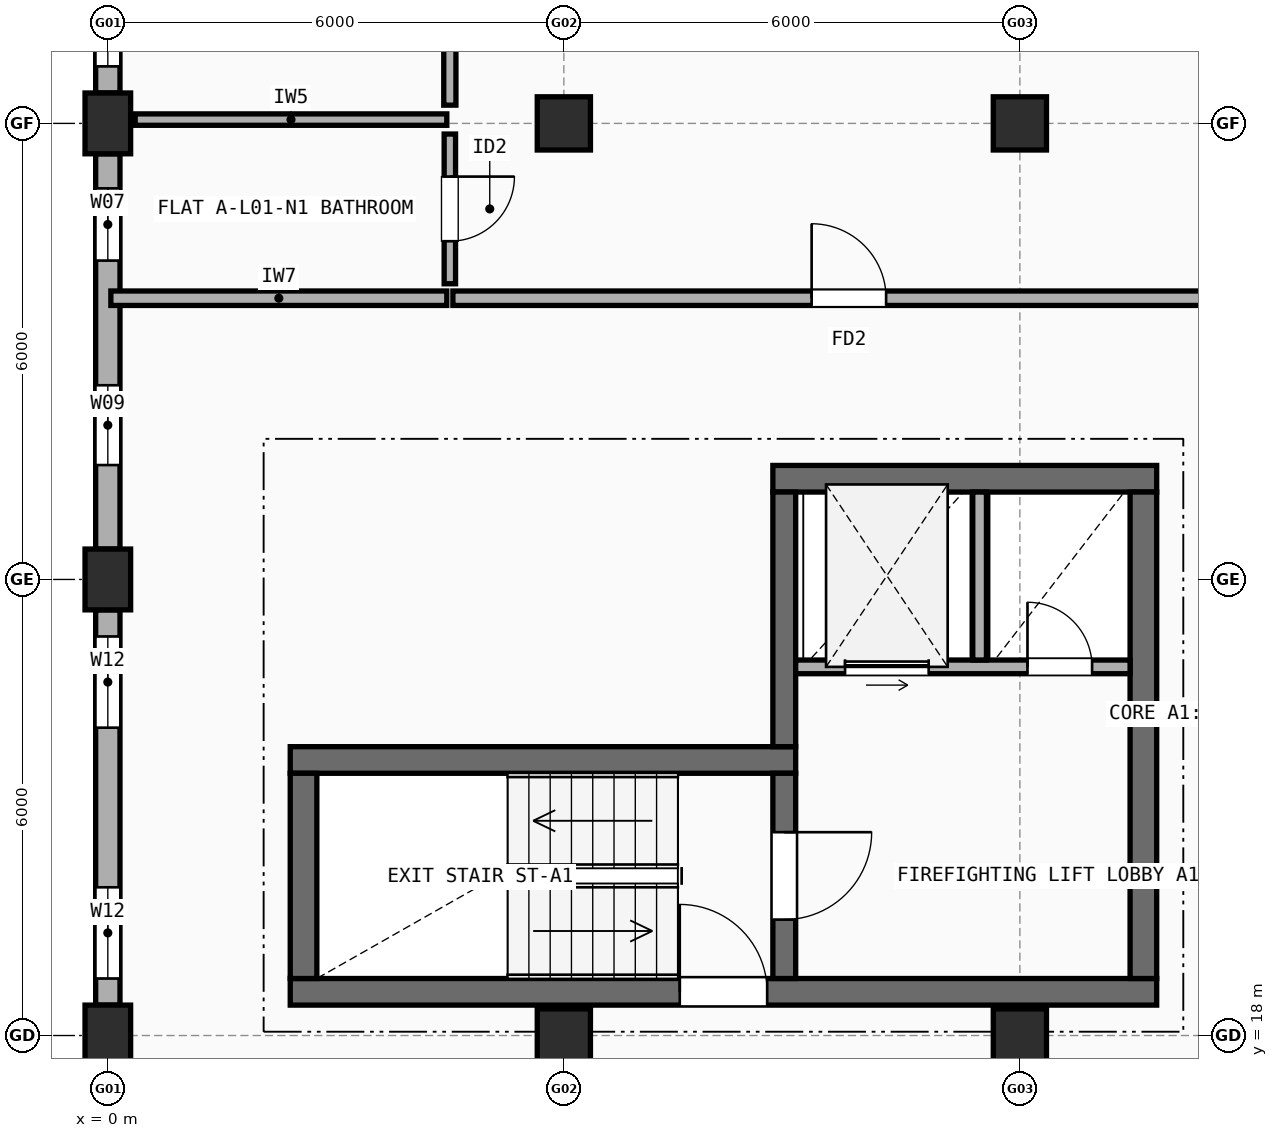
"""IFC4 building model, lengths in metres.
Left out: names, types, materials, properties, quantities, classifications, styles, units other than length and angle.
Written with IfcOpenShell. Run it as: python <this file> out.ifc"""

import sys

from ifc_helpers import new_model, si_unit, direction, frame, frame_2d, origin, origin_2d, place, context, subcontext, project, spatial, rectangle, extrude, element, fill, save


model = new_model("IFC4")
c1 = context("Model", 3, precision=1e-05, world=origin(), true_north=direction((0.0, 1.0)))
c2 = subcontext(c1, "Body", "Model", "MODEL_VIEW")
j1 = project(units=[si_unit("LENGTHUNIT", "METRE"), si_unit("PLANEANGLEUNIT", "RADIAN")], contexts=[c1])
p1 = place(None, origin())
s1 = spatial("IfcSite", under=j1, at=p1, CompositionType="ELEMENT")
p2 = place(p1, origin())
s2 = spatial("IfcBuilding", under=s1, at=p2, CompositionType="ELEMENT")
p3 = place(p2, frame((0.0, 0.0, 4.5)))
s3 = spatial("IfcBuildingStorey", under=s2, at=p3, CompositionType="ELEMENT", Elevation=4.5)
for number, where, z_axis, x_axis in (
    (1, (0.0, 18.0, 0.0), (0.0, 0.0, 1.0), (1.0, 0.0, 0.0)),
    (2, (0.0, 24.0, 0.0), (0.0, 0.0, 1.0), (1.0, 0.0, 0.0)),
    (3, (0.0, 30.0, 0.0), (0.0, 0.0, 1.0), (1.0, 0.0, 0.0)),
):
    element("IfcColumn", number, at=place(p3, frame(where, z_axis=z_axis, x_axis=x_axis)), inside=s3, PredefinedType="COLUMN", context=c2, shape_type="SweptSolid", body=[
        extrude(rectangle(XDim=0.6, YDim=0.8, at=origin_2d()), origin(), (0.0, 0.0, 1.0), 2.945),
    ])
for number, where, z_axis, x_axis in (
    (4, (6.0, 18.0, 0.0), (0.0, 0.0, 1.0), (1.0, 0.0, 0.0)),
    (5, (6.0, 30.0, 0.0), (0.0, 0.0, 1.0), (1.0, 0.0, 0.0)),
    (6, (12.0, 18.0, 0.0), (0.0, 0.0, 1.0), (1.0, 0.0, 0.0)),
    (7, (12.0, 30.0, 0.0), (0.0, 0.0, 1.0), (1.0, 0.0, 0.0)),
):
    element("IfcColumn", number, at=place(p3, frame(where, z_axis=z_axis, x_axis=x_axis)), inside=s3, PredefinedType="COLUMN", context=c2, shape_type="SweptSolid", body=[
        extrude(rectangle(XDim=0.7, YDim=0.7, at=origin_2d()), origin(), (0.0, 0.0, 1.0), 2.945),
    ])
p4 = place(p3, frame((0.0, 35.6, 0.0), z_axis=(0.0, 0.0, 1.0), x_axis=(0.0, -1.0, 0.0)))
e8 = element("IfcWall", 8, at=p4, inside=s3, PredefinedType="STANDARD", context=c2, shape_type="SweptSolid", body=[
    extrude(rectangle(XDim=5.2, YDim=0.32, at=frame_2d((2.6, 0.0))), origin(), (0.0, 0.0, 1.0), 2.427),
])
p5 = place(p4, frame((0.35, 0.0, 0.9)))
e9 = element("IfcOpeningElement", 9, at=p5, cuts=e8, PredefinedType="OPENING", context=c2, shape_type="SweptSolid", body=[
    extrude(rectangle(XDim=0.85, YDim=1.25, at=frame_2d((0.425, 0.625))), frame((0.0, 0.17, 0.0), z_axis=(0.0, -1.0, 0.0), x_axis=(1.0, 0.0, 0.0)), (0.0, 0.0, 1.0), 0.34),
])
p6 = place(p4, frame((4.0, 0.0, 0.9)))
e10 = element("IfcOpeningElement", 10, at=p6, cuts=e8, PredefinedType="OPENING", context=c2, shape_type="SweptSolid", body=[
    extrude(rectangle(XDim=0.85, YDim=1.25, at=frame_2d((0.425, 0.625))), frame((0.0, 0.17, 0.0), z_axis=(0.0, -1.0, 0.0), x_axis=(1.0, 0.0, 0.0)), (0.0, 0.0, 1.0), 0.34),
])
p7 = place(p3, frame((0.0, 29.6, 0.0), z_axis=(0.0, 0.0, 1.0), x_axis=(0.0, -1.0, 0.0)))
e11 = element("IfcWall", 11, at=p7, inside=s3, PredefinedType="STANDARD", context=c2, shape_type="SweptSolid", body=[
    extrude(rectangle(XDim=5.2, YDim=0.32, at=frame_2d((2.6, 0.0))), origin(), (0.0, 0.0, 1.0), 2.427),
])
p8 = place(p7, frame((0.455, 0.0, 0.9)))
e12 = element("IfcOpeningElement", 12, at=p8, cuts=e11, PredefinedType="OPENING", context=c2, shape_type="SweptSolid", body=[
    extrude(rectangle(XDim=0.95, YDim=1.35, at=frame_2d((0.475, 0.675))), frame((0.0, 0.17, 0.0), z_axis=(0.0, -1.0, 0.0), x_axis=(1.0, 0.0, 0.0)), (0.0, 0.0, 1.0), 0.34),
])
p9 = place(p7, frame((3.045, 0.0, 0.9)))
e13 = element("IfcOpeningElement", 13, at=p9, cuts=e11, PredefinedType="OPENING", context=c2, shape_type="SweptSolid", body=[
    extrude(rectangle(XDim=1.05, YDim=1.35, at=frame_2d((0.525, 0.675))), frame((0.0, 0.17, 0.0), z_axis=(0.0, -1.0, 0.0), x_axis=(1.0, 0.0, 0.0)), (0.0, 0.0, 1.0), 0.34),
])
p10 = place(p3, frame((0.0, 23.6, 0.0), z_axis=(0.0, 0.0, 1.0), x_axis=(0.0, -1.0, 0.0)))
e14 = element("IfcWall", 14, at=p10, inside=s3, PredefinedType="STANDARD", context=c2, shape_type="SweptSolid", body=[
    extrude(rectangle(XDim=5.2, YDim=0.32, at=frame_2d((2.6, 0.0))), origin(), (0.0, 0.0, 1.0), 2.427),
])
p11 = place(p10, frame((0.35, 0.0, 0.9)))
e15 = element("IfcOpeningElement", 15, at=p11, cuts=e14, PredefinedType="OPENING", context=c2, shape_type="SweptSolid", body=[
    extrude(rectangle(XDim=1.2, YDim=1.35, at=frame_2d((0.6, 0.675))), frame((0.0, 0.17, 0.0), z_axis=(0.0, -1.0, 0.0), x_axis=(1.0, 0.0, 0.0)), (0.0, 0.0, 1.0), 0.34),
])
p12 = place(p10, frame((3.65, 0.0, 0.9)))
e16 = element("IfcOpeningElement", 16, at=p12, cuts=e14, PredefinedType="OPENING", context=c2, shape_type="SweptSolid", body=[
    extrude(rectangle(XDim=1.2, YDim=1.35, at=frame_2d((0.6, 0.675))), frame((0.0, 0.17, 0.0), z_axis=(0.0, -1.0, 0.0), x_axis=(1.0, 0.0, 0.0)), (0.0, 0.0, 1.0), 0.34),
])
p13 = place(p3, frame((2.4, 18.575, 0.0), z_axis=(0.0, 0.0, 1.0), x_axis=(1.0, 0.0, 0.0)))
e17 = element("IfcWall", 17, at=p13, inside=s3, PredefinedType="SHEAR", context=c2, shape_type="SweptSolid", body=[
    extrude(rectangle(XDim=11.4, YDim=0.35, at=frame_2d((5.7, 0.0))), origin(), (0.0, 0.0, 1.0), 2.945),
])
p14 = place(p13, frame((5.125, 0.0, 0.0)))
e18 = element("IfcOpeningElement", 18, at=p14, cuts=e17, PredefinedType="OPENING", context=c2, shape_type="SweptSolid", body=[
    extrude(rectangle(XDim=1.15, YDim=2.15, at=frame_2d((0.575, 1.075))), frame((0.0, 0.185, 0.0), z_axis=(0.0, -1.0, 0.0), x_axis=(1.0, 0.0, 0.0)), (0.0, 0.0, 1.0), 0.37),
])
p15 = place(p3, frame((9.05, 21.625, 0.0), z_axis=(0.0, 0.0, 1.0), x_axis=(-1.0, 0.0, 0.0)))
e19 = element("IfcWall", 19, at=p15, inside=s3, PredefinedType="SHEAR", context=c2, shape_type="SweptSolid", body=[
    extrude(rectangle(XDim=6.65, YDim=0.35, at=frame_2d((3.325, 0.0))), origin(), (0.0, 0.0, 1.0), 2.945),
])
p16 = place(p3, frame((2.575, 21.45, 0.0), z_axis=(0.0, 0.0, 1.0), x_axis=(0.0, -1.0, 0.0)))
e20 = element("IfcWall", 20, at=p16, inside=s3, PredefinedType="SHEAR", context=c2, shape_type="SweptSolid", body=[
    extrude(rectangle(XDim=2.7, YDim=0.35, at=frame_2d((1.35, 0.0))), origin(), (0.0, 0.0, 1.0), 2.945),
])
p17 = place(p3, frame((8.9, 18.75, 0.0), z_axis=(0.0, 0.0, 1.0), x_axis=(0.0, 1.0, 0.0)))
e21 = element("IfcWall", 21, at=p17, inside=s3, PredefinedType="SHEAR", context=c2, shape_type="SweptSolid", body=[
    extrude(rectangle(XDim=2.7, YDim=0.3, at=frame_2d((1.35, 0.0))), origin(), (0.0, 0.0, 1.0), 2.945),
])
p18 = place(p17, frame((0.775, 0.0, 0.0)))
e22 = element("IfcOpeningElement", 22, at=p18, cuts=e21, PredefinedType="OPENING", context=c2, shape_type="SweptSolid", body=[
    extrude(rectangle(XDim=1.15, YDim=2.15, at=frame_2d((0.575, 1.075))), frame((0.0, 0.16, 0.0), z_axis=(0.0, -1.0, 0.0), x_axis=(1.0, 0.0, 0.0)), (0.0, 0.0, 1.0), 0.32),
])
p19 = place(p3, frame((13.8, 25.325, 0.0), z_axis=(0.0, 0.0, 1.0), x_axis=(-1.0, 0.0, 0.0)))
e23 = element("IfcWall", 23, at=p19, inside=s3, PredefinedType="SHEAR", context=c2, shape_type="SweptSolid", body=[
    extrude(rectangle(XDim=5.05, YDim=0.35, at=frame_2d((2.525, 0.0))), origin(), (0.0, 0.0, 1.0), 2.945),
])
p20 = place(p3, frame((13.625, 18.75, 0.0), z_axis=(0.0, 0.0, 1.0), x_axis=(0.0, 1.0, 0.0)))
e24 = element("IfcWall", 24, at=p20, inside=s3, PredefinedType="SHEAR", context=c2, shape_type="SweptSolid", body=[
    extrude(rectangle(XDim=6.4, YDim=0.35, at=frame_2d((3.2, 0.0))), origin(), (0.0, 0.0, 1.0), 2.945),
])
p21 = place(p3, frame((8.9, 21.8, 0.0), z_axis=(0.0, 0.0, 1.0), x_axis=(0.0, 1.0, 0.0)))
e25 = element("IfcWall", 25, at=p21, inside=s3, PredefinedType="SHEAR", context=c2, shape_type="SweptSolid", body=[
    extrude(rectangle(XDim=3.35, YDim=0.3, at=frame_2d((1.675, 0.0))), origin(), (0.0, 0.0, 1.0), 2.945),
])
p22 = place(p3, frame((9.05, 22.85, 0.0), z_axis=(0.0, 0.0, 1.0), x_axis=(1.0, 0.0, 0.0)))
e26 = element("IfcWall", 26, at=p22, inside=s3, PredefinedType="SOLIDWALL", context=c2, shape_type="SweptSolid", body=[
    extrude(rectangle(XDim=4.4, YDim=0.18, at=frame_2d((2.2, 0.0))), origin(), (0.0, 0.0, 1.0), 2.945),
])
p23 = place(p22, frame((0.65, 0.0, 0.0)))
e27 = element("IfcOpeningElement", 27, at=p23, cuts=e26, PredefinedType="OPENING", context=c2, shape_type="SweptSolid", body=[
    extrude(rectangle(XDim=1.1, YDim=2.15, at=frame_2d((0.55, 1.075))), frame((0.0, 0.1, 0.0), z_axis=(0.0, -1.0, 0.0), x_axis=(1.0, 0.0, 0.0)), (0.0, 0.0, 1.0), 0.2),
])
p24 = place(p22, frame((3.05, 0.0, 0.0)))
e28 = element("IfcOpeningElement", 28, at=p24, cuts=e26, PredefinedType="OPENING", context=c2, shape_type="SweptSolid", body=[
    extrude(rectangle(XDim=0.85, YDim=2.1, at=frame_2d((0.425, 1.05))), frame((0.0, 0.1, 0.0), z_axis=(0.0, -1.0, 0.0), x_axis=(1.0, 0.0, 0.0)), (0.0, 0.0, 1.0), 0.2),
])
p25 = place(p3, frame((11.47, 22.94, 0.0), z_axis=(0.0, 0.0, 1.0), x_axis=(0.0, 1.0, 0.0)))
e29 = element("IfcWall", 29, at=p25, inside=s3, PredefinedType="SOLIDWALL", context=c2, shape_type="SweptSolid", body=[
    extrude(rectangle(XDim=2.21, YDim=0.18, at=frame_2d((1.105, 0.0))), origin(), (0.0, 0.0, 1.0), 2.945),
])
p26 = place(p3, frame((0.04, 27.7, 0.0), z_axis=(0.0, 0.0, 1.0), x_axis=(1.0, 0.0, 0.0)))
e30 = element("IfcWall", 30, at=p26, inside=s3, PredefinedType="SOLIDWALL", context=c2, shape_type="SweptSolid", body=[
    extrude(rectangle(XDim=4.42, YDim=0.19, at=frame_2d((2.21, 0.0))), origin(), (0.0, 0.0, 1.0), 2.427),
])
p27 = place(p3, frame((4.54, 27.7, 0.0), z_axis=(0.0, 0.0, 1.0), x_axis=(1.0, 0.0, 0.0)))
e31 = element("IfcWall", 31, at=p27, inside=s3, PredefinedType="SOLIDWALL", context=c2, shape_type="SweptSolid", body=[
    extrude(rectangle(XDim=10.42, YDim=0.19, at=frame_2d((5.21, 0.0))), origin(), (0.0, 0.0, 1.0), 2.508),
])
p28 = place(p27, frame((4.72, 0.0, 0.0)))
e32 = element("IfcOpeningElement", 32, at=p28, cuts=e31, PredefinedType="OPENING", context=c2, shape_type="SweptSolid", body=[
    extrude(rectangle(XDim=0.98, YDim=2.15, at=frame_2d((0.49, 1.075))), frame((0.0, 0.105, 0.0), z_axis=(0.0, -1.0, 0.0), x_axis=(1.0, 0.0, 0.0)), (0.0, 0.0, 1.0), 0.21),
])
p29 = place(p3, frame((4.5, 30.24, 0.0), z_axis=(0.0, 0.0, 1.0), x_axis=(0.0, 1.0, 0.0)))
e33 = element("IfcWall", 33, at=p29, inside=s3, PredefinedType="PLUMBINGWALL", context=c2, shape_type="SweptSolid", body=[
    extrude(rectangle(XDim=7.37, YDim=0.16, at=frame_2d((3.685, 0.0))), origin(), (0.0, 0.0, 1.0), 2.427),
])
p30 = place(p29, frame((3.245, 0.0, 0.0)))
e34 = element("IfcOpeningElement", 34, at=p30, cuts=e33, PredefinedType="OPENING", context=c2, shape_type="SweptSolid", body=[
    extrude(rectangle(XDim=0.88, YDim=2.1, at=frame_2d((0.44, 1.05))), frame((0.0, 0.09, 0.0), z_axis=(0.0, -1.0, 0.0), x_axis=(1.0, 0.0, 0.0)), (0.0, 0.0, 1.0), 0.18),
])
p31 = place(p3, frame((4.5, 27.89, 0.0), z_axis=(0.0, 0.0, 1.0), x_axis=(0.0, 1.0, 0.0)))
e35 = element("IfcWall", 35, at=p31, inside=s3, PredefinedType="PARTITIONING", context=c2, shape_type="SweptSolid", body=[
    extrude(rectangle(XDim=1.97, YDim=0.15, at=frame_2d((0.985, 0.0))), origin(), (0.0, 0.0, 1.0), 2.945),
])
p32 = place(p31, frame((0.56, 0.0, 0.0)))
e36 = element("IfcOpeningElement", 36, at=p32, cuts=e35, PredefinedType="OPENING", context=c2, shape_type="SweptSolid", body=[
    extrude(rectangle(XDim=0.85, YDim=2.1, at=frame_2d((0.425, 1.05))), frame((0.0, 0.085, 0.0), z_axis=(0.0, -1.0, 0.0), x_axis=(1.0, 0.0, 0.0)), (0.0, 0.0, 1.0), 0.17),
])
p33 = place(p3, frame((0.36, 30.05, 0.0), z_axis=(0.0, 0.0, 1.0), x_axis=(1.0, 0.0, 0.0)))
e37 = element("IfcWall", 37, at=p33, inside=s3, PredefinedType="PARTITIONING", context=c2, shape_type="SweptSolid", body=[
    extrude(rectangle(XDim=4.1, YDim=0.15, at=frame_2d((2.05, 0.0))), origin(), (0.0, 0.0, 1.0), 2.427),
])
p34 = place(p6, origin())
e38 = element("IfcWindow", 38, at=p34, inside=s3, PartitioningType="SINGLE_PANEL", PredefinedType="WINDOW", context=c2, shape_type="SweptSolid", body=[
    extrude(rectangle(XDim=0.85, YDim=1.25, at=frame_2d((0.425, 0.625))), frame((0.0, 0.03, 0.0), z_axis=(0.0, -1.0, 0.0), x_axis=(1.0, 0.0, 0.0)), (0.0, 0.0, 1.0), 0.06),
])
fill(e10, e38)
p35 = place(p8, origin())
e39 = element("IfcWindow", 39, at=p35, inside=s3, PartitioningType="SINGLE_PANEL", PredefinedType="WINDOW", context=c2, shape_type="SweptSolid", body=[
    extrude(rectangle(XDim=0.95, YDim=1.35, at=frame_2d((0.475, 0.675))), frame((0.0, 0.03, 0.0), z_axis=(0.0, -1.0, 0.0), x_axis=(1.0, 0.0, 0.0)), (0.0, 0.0, 1.0), 0.06),
])
fill(e12, e39)
p36 = place(p9, origin())
e40 = element("IfcWindow", 40, at=p36, inside=s3, PartitioningType="SINGLE_PANEL", PredefinedType="WINDOW", context=c2, shape_type="SweptSolid", body=[
    extrude(rectangle(XDim=1.05, YDim=1.35, at=frame_2d((0.525, 0.675))), frame((0.0, 0.03, 0.0), z_axis=(0.0, -1.0, 0.0), x_axis=(1.0, 0.0, 0.0)), (0.0, 0.0, 1.0), 0.06),
])
fill(e13, e40)
p37 = place(p11, origin())
e41 = element("IfcWindow", 41, at=p37, inside=s3, PartitioningType="SINGLE_PANEL", PredefinedType="WINDOW", context=c2, shape_type="SweptSolid", body=[
    extrude(rectangle(XDim=1.2, YDim=1.35, at=frame_2d((0.6, 0.675))), frame((0.0, 0.03, 0.0), z_axis=(0.0, -1.0, 0.0), x_axis=(1.0, 0.0, 0.0)), (0.0, 0.0, 1.0), 0.06),
])
fill(e15, e41)
p38 = place(p12, origin())
e42 = element("IfcWindow", 42, at=p38, inside=s3, PartitioningType="SINGLE_PANEL", PredefinedType="WINDOW", context=c2, shape_type="SweptSolid", body=[
    extrude(rectangle(XDim=1.2, YDim=1.35, at=frame_2d((0.6, 0.675))), frame((0.0, 0.03, 0.0), z_axis=(0.0, -1.0, 0.0), x_axis=(1.0, 0.0, 0.0)), (0.0, 0.0, 1.0), 0.06),
])
fill(e16, e42)
p39 = place(p14, origin())
e43 = element("IfcDoor", 43, at=p39, inside=s3, OperationType="SINGLE_SWING_LEFT", PredefinedType="DOOR", context=c2, shape_type="SweptSolid", body=[
    extrude(rectangle(XDim=1.15, YDim=2.15, at=frame_2d((0.575, 1.075))), frame((0.0, 0.025, 0.0), z_axis=(0.0, -1.0, 0.0), x_axis=(1.0, 0.0, 0.0)), (0.0, 0.0, 1.0), 0.05),
])
fill(e18, e43)
p40 = place(p18, origin())
e44 = element("IfcDoor", 44, at=p40, inside=s3, OperationType="SINGLE_SWING_RIGHT", PredefinedType="DOOR", context=c2, shape_type="SweptSolid", body=[
    extrude(rectangle(XDim=1.15, YDim=2.15, at=frame_2d((0.575, 1.075))), frame((0.0, 0.025, 0.0), z_axis=(0.0, -1.0, 0.0), x_axis=(1.0, 0.0, 0.0)), (0.0, 0.0, 1.0), 0.05),
])
fill(e22, e44)
p41 = place(p23, origin())
e45 = element("IfcDoor", 45, at=p41, inside=s3, OperationType="SLIDING_TO_LEFT", PredefinedType="DOOR", context=c2, shape_type="SweptSolid", body=[
    extrude(rectangle(XDim=1.1, YDim=2.15, at=frame_2d((0.55, 1.075))), frame((0.0, 0.025, 0.0), z_axis=(0.0, -1.0, 0.0), x_axis=(1.0, 0.0, 0.0)), (0.0, 0.0, 1.0), 0.05),
])
fill(e27, e45)
p42 = place(p24, frame((0.85, 0.0, 0.0), z_axis=(0.0, 0.0, 1.0), x_axis=(-1.0, 0.0, 0.0)))
e46 = element("IfcDoor", 46, at=p42, inside=s3, OperationType="SINGLE_SWING_LEFT", PredefinedType="DOOR", context=c2, shape_type="SweptSolid", body=[
    extrude(rectangle(XDim=0.85, YDim=2.1, at=frame_2d((0.425, 1.05))), frame((0.0, 0.025, 0.0), z_axis=(0.0, -1.0, 0.0), x_axis=(1.0, 0.0, 0.0)), (0.0, 0.0, 1.0), 0.05),
])
fill(e28, e46)
p43 = place(p28, origin())
e47 = element("IfcDoor", 47, at=p43, inside=s3, OperationType="SINGLE_SWING_LEFT", PredefinedType="DOOR", context=c2, shape_type="SweptSolid", body=[
    extrude(rectangle(XDim=0.98, YDim=2.15, at=frame_2d((0.49, 1.075))), frame((0.0, 0.025, 0.0), z_axis=(0.0, -1.0, 0.0), x_axis=(1.0, 0.0, 0.0)), (0.0, 0.0, 1.0), 0.05),
])
fill(e32, e47)
p44 = place(p32, origin())
e48 = element("IfcDoor", 48, at=p44, inside=s3, OperationType="SINGLE_SWING_RIGHT", PredefinedType="DOOR", context=c2, shape_type="SweptSolid", body=[
    extrude(rectangle(XDim=0.85, YDim=2.1, at=frame_2d((0.425, 1.05))), frame((0.0, 0.025, 0.0), z_axis=(0.0, -1.0, 0.0), x_axis=(1.0, 0.0, 0.0)), (0.0, 0.0, 1.0), 0.05),
])
fill(e36, e48)
save(model, sys.argv[1])
